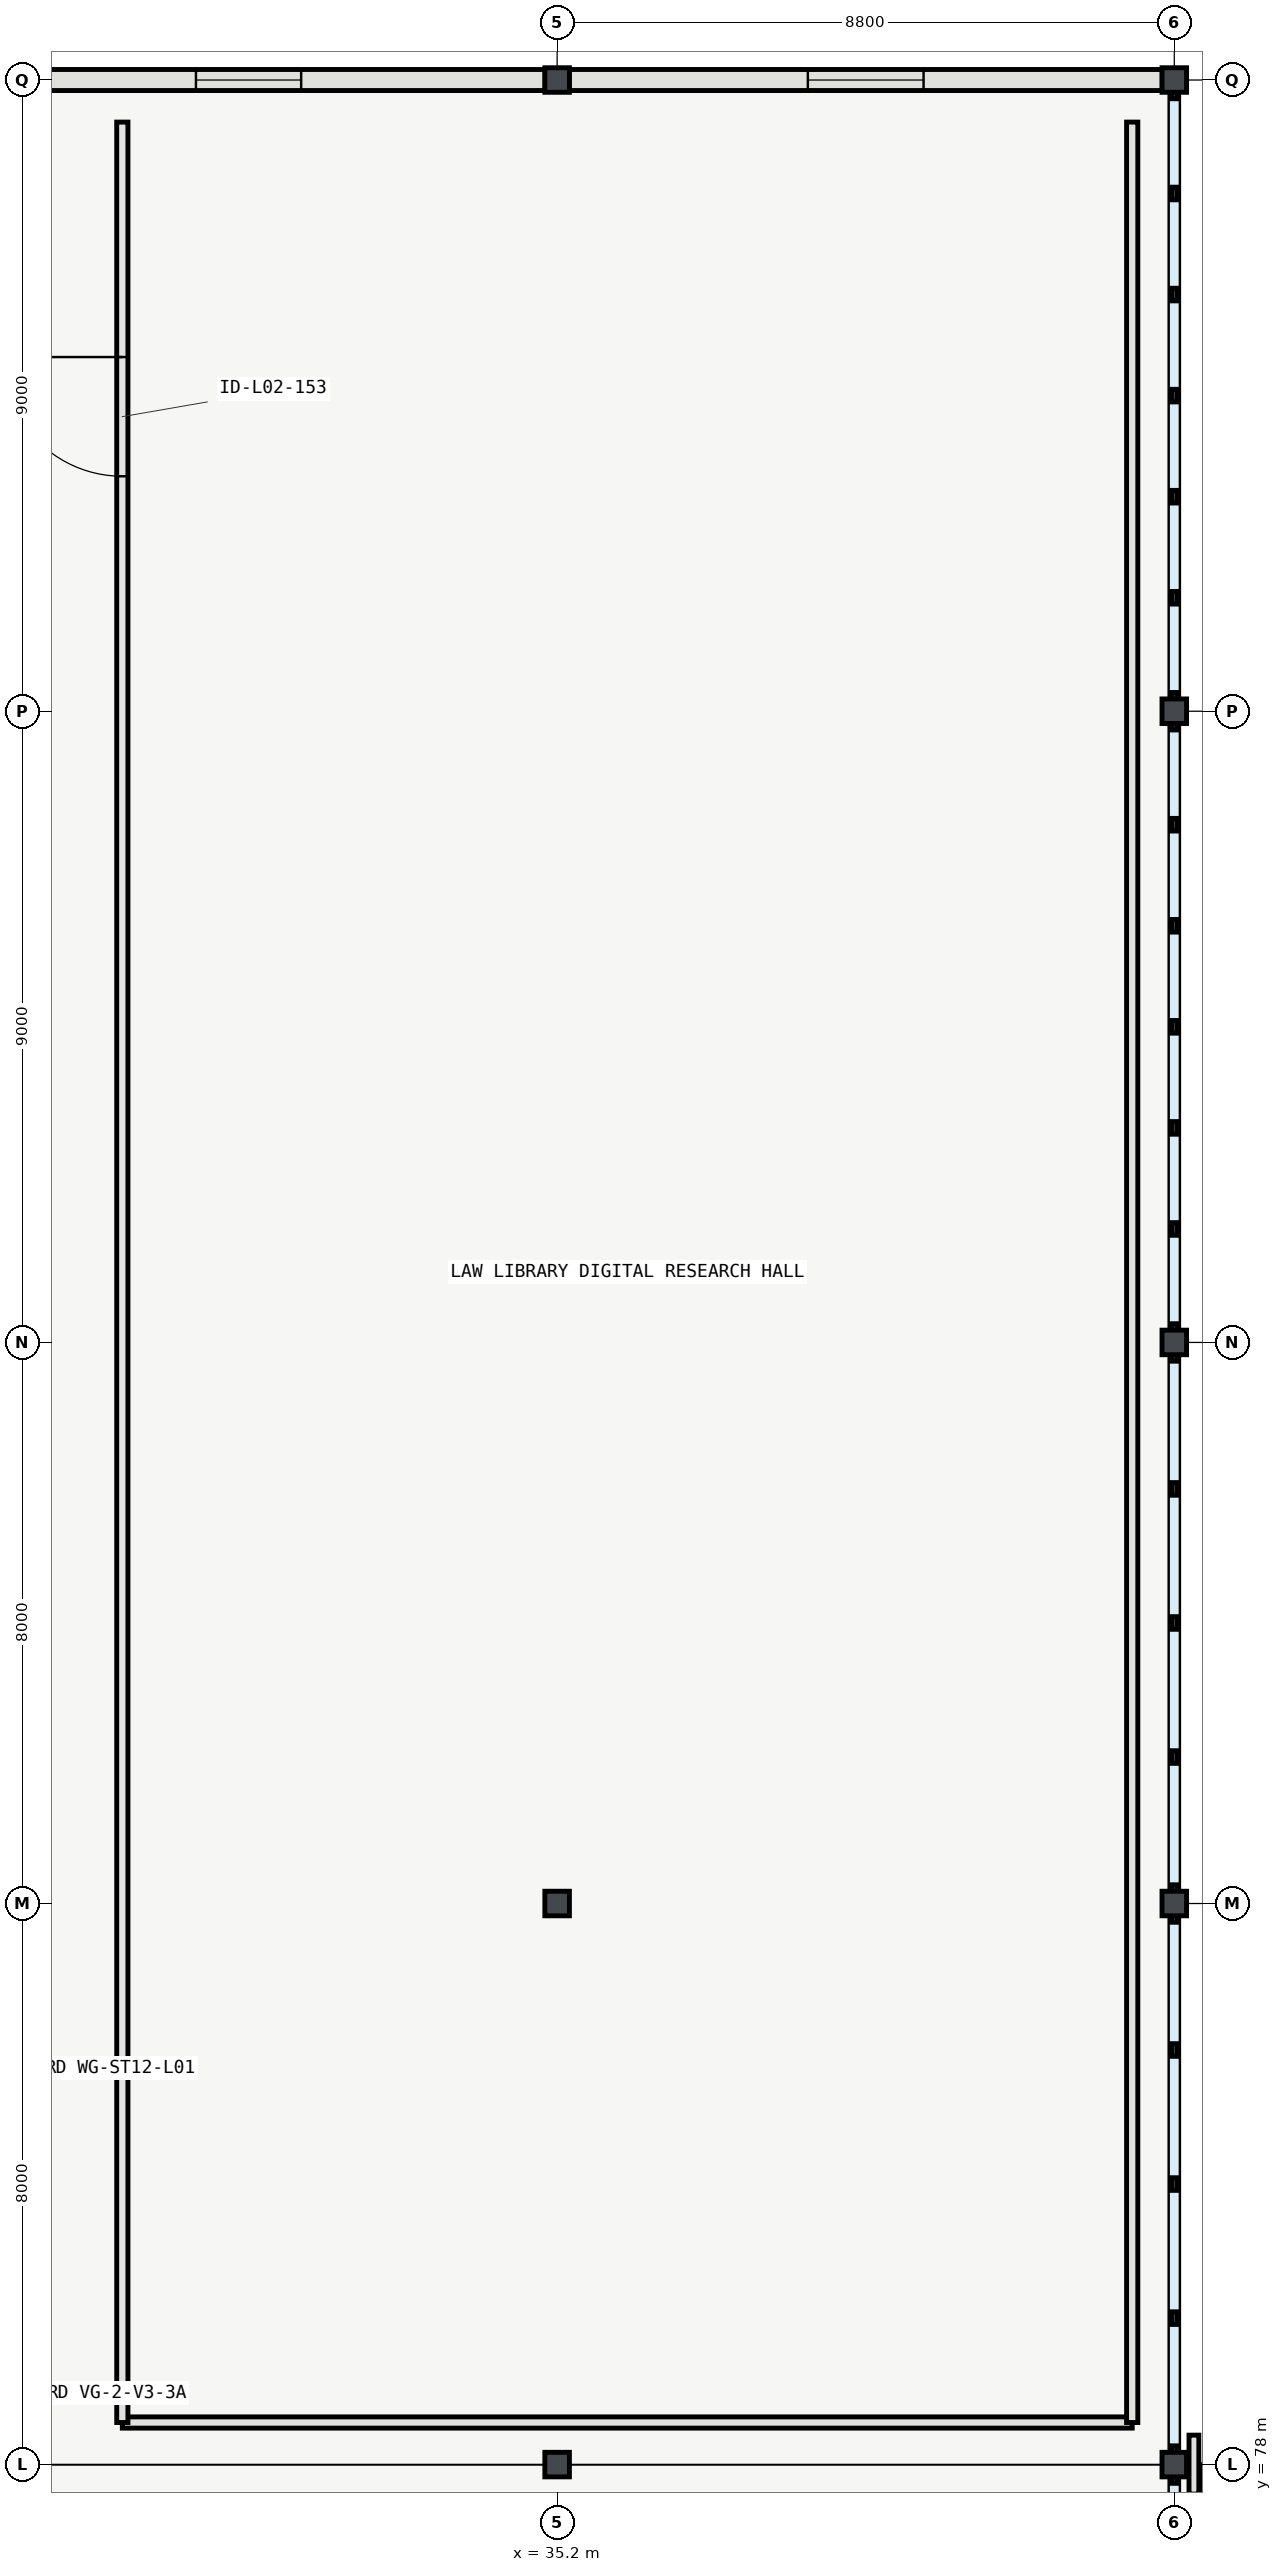
"""IFC4 building model, lengths in metres.
Left out: names, types, materials, properties, quantities, classifications, styles, units other than length and angle.
Written with IfcOpenShell. Run it as: python <this file> out.ifc"""

import sys

from ifc_helpers import new_model, si_unit, direction, frame, frame_2d, origin, origin_2d, place, context, subcontext, project, spatial, rectangle, i_section, extrude, element, fill, save


model = new_model("IFC4")
c1 = context("Model", 3, precision=1e-05, world=origin(), true_north=direction((0.0, 1.0)))
c2 = subcontext(c1, "Body", "Model", "MODEL_VIEW")
j1 = project(units=[si_unit("LENGTHUNIT", "METRE"), si_unit("PLANEANGLEUNIT", "RADIAN")], contexts=[c1])
p1 = place(None, origin())
s1 = spatial("IfcSite", under=j1, at=p1, CompositionType="ELEMENT")
p2 = place(p1, origin())
s2 = spatial("IfcBuilding", under=s1, at=p2, CompositionType="ELEMENT")
p3 = place(p2, frame((0.0, 0.0, 10.8)))
s3 = spatial("IfcBuildingStorey", under=s2, at=p3, CompositionType="ELEMENT", Elevation=10.8)
for number, where, z_axis, x_axis in (
    (1, (35.2, 78.0, 0.0), (0.0, 0.0, 1.0), (1.0, 0.0, 0.0)),
    (2, (35.2, 86.0, 0.0), (0.0, 0.0, 1.0), (1.0, 0.0, 0.0)),
    (3, (35.2, 112.0, 0.0), (0.0, 0.0, 1.0), (1.0, 0.0, 0.0)),
    (4, (44.0, 78.0, 0.0), (0.0, 0.0, 1.0), (1.0, 0.0, 0.0)),
    (5, (44.0, 86.0, 0.0), (0.0, 0.0, 1.0), (1.0, 0.0, 0.0)),
    (6, (44.0, 94.0, 0.0), (0.0, 0.0, 1.0), (1.0, 0.0, 0.0)),
    (7, (44.0, 103.0, 0.0), (0.0, 0.0, 1.0), (1.0, 0.0, 0.0)),
    (8, (44.0, 112.0, 0.0), (0.0, 0.0, 1.0), (1.0, 0.0, 0.0)),
):
    element("IfcColumn", number, at=place(p3, frame(where, z_axis=z_axis, x_axis=x_axis)), inside=s3, PredefinedType="COLUMN", context=c2, shape_type="SweptSolid", body=[
        extrude(i_section(OverallWidth=0.35, OverallDepth=0.35, WebThickness=0.012, FlangeThickness=0.019, FilletRadius=0.02, at=origin_2d()), origin(), (0.0, 0.0, 1.0), 5.4),
    ])
p4 = place(p3, frame((35.029, 112.0, 0.0), z_axis=(0.0, 0.0, 1.0), x_axis=(-1.0, 0.0, 0.0)))
e9 = element("IfcWall", 9, at=p4, inside=s3, PredefinedType="SOLIDWALL", context=c2, shape_type="SweptSolid", body=[
    extrude(rectangle(XDim=8.458, YDim=0.3, at=frame_2d((4.229, 0.0))), origin(), (0.0, 0.0, 1.0), 4.763),
])
p5 = place(p4, frame((3.479, 0.0, 0.95)))
e10 = element("IfcOpeningElement", 10, at=p5, cuts=e9, PredefinedType="OPENING", context=c2, shape_type="SweptSolid", body=[
    extrude(rectangle(XDim=1.5, YDim=2.1, at=frame_2d((0.75, 1.05))), frame((0.0, 0.16, 0.0), z_axis=(0.0, -1.0, 0.0), x_axis=(1.0, 0.0, 0.0)), (0.0, 0.0, 1.0), 0.32),
])
p6 = place(p3, frame((43.829, 112.0, 0.0), z_axis=(0.0, 0.0, 1.0), x_axis=(-1.0, 0.0, 0.0)))
e11 = element("IfcWall", 11, at=p6, inside=s3, PredefinedType="SOLIDWALL", context=c2, shape_type="SweptSolid", body=[
    extrude(rectangle(XDim=8.458, YDim=0.3, at=frame_2d((4.229, 0.0))), origin(), (0.0, 0.0, 1.0), 4.763),
])
p7 = place(p6, frame((3.404, 0.0, 0.95)))
e12 = element("IfcOpeningElement", 12, at=p7, cuts=e11, PredefinedType="OPENING", context=c2, shape_type="SweptSolid", body=[
    extrude(rectangle(XDim=1.65, YDim=2.1, at=frame_2d((0.825, 1.05))), frame((0.0, 0.16, 0.0), z_axis=(0.0, -1.0, 0.0), x_axis=(1.0, 0.0, 0.0)), (0.0, 0.0, 1.0), 0.32),
])
p8 = place(p3, frame((44.44, 30.0, 0.0), z_axis=(0.0, 0.0, 1.0), x_axis=(0.0, 1.0, 0.0)))
e13 = element("IfcWall", 13, at=p8, inside=s3, PredefinedType="SOLIDWALL", context=c2, shape_type="SweptSolid", body=[
    extrude(rectangle(XDim=48.0, YDim=0.16, at=frame_2d((24.0, 0.0))), origin(), (0.0, 0.0, 1.0), 0.58),
])
p9 = place(p3, frame((44.28, 77.58, 0.0), z_axis=(0.0, 0.0, 1.0), x_axis=(0.0, 1.0, 0.0)))
e14 = element("IfcWall", 14, at=p9, inside=s3, PredefinedType="SOLIDWALL", context=c2, shape_type="SweptSolid", body=[
    extrude(rectangle(XDim=0.84, YDim=0.14, at=frame_2d((0.42, 0.0))), origin(), (0.0, 0.0, 1.0), 5.14),
])
p10 = place(p3, frame((29.0, 78.6, 0.0), z_axis=(0.0, 0.0, 1.0), x_axis=(1.0, 0.0, 0.0)))
e15 = element("IfcWall", 15, at=p10, inside=s3, PredefinedType="PARTITIONING", context=c2, shape_type="SweptSolid", body=[
    extrude(rectangle(XDim=14.4, YDim=0.16, at=frame_2d((7.2, 0.0))), origin(), (0.0, 0.0, 1.0), 5.12),
])
p11 = place(p3, frame((29.0, 111.4, 0.0), z_axis=(0.0, 0.0, 1.0), x_axis=(0.0, -1.0, 0.0)))
e16 = element("IfcWall", 16, at=p11, inside=s3, PredefinedType="PARTITIONING", context=c2, shape_type="SweptSolid", body=[
    extrude(rectangle(XDim=32.8, YDim=0.16, at=frame_2d((16.4, 0.0))), origin(), (0.0, 0.0, 1.0), 5.12),
])
p12 = place(p11, frame((3.35, 0.0, 0.0)))
e17 = element("IfcOpeningElement", 17, at=p12, cuts=e16, PredefinedType="OPENING", context=c2, shape_type="SweptSolid", body=[
    extrude(rectangle(XDim=1.7, YDim=2.3, at=frame_2d((0.85, 1.15))), frame((0.0, 0.09, 0.0), z_axis=(0.0, -1.0, 0.0), x_axis=(1.0, 0.0, 0.0)), (0.0, 0.0, 1.0), 0.18),
])
p13 = place(p3, frame((43.4, 78.6, 0.0), z_axis=(0.0, 0.0, 1.0), x_axis=(0.0, 1.0, 0.0)))
e18 = element("IfcWall", 18, at=p13, inside=s3, PredefinedType="PARTITIONING", context=c2, shape_type="SweptSolid", body=[
    extrude(rectangle(XDim=32.8, YDim=0.16, at=frame_2d((16.4, 0.0))), origin(), (0.0, 0.0, 1.0), 5.12),
])
p14 = place(p5, origin())
e19 = element("IfcWindow", 19, at=p14, inside=s3, PartitioningType="SINGLE_PANEL", PredefinedType="WINDOW", context=c2, shape_type="SweptSolid", body=[
    extrude(rectangle(XDim=1.5, YDim=2.1, at=frame_2d((0.75, 1.05))), frame((0.0, 0.03, 0.0), z_axis=(0.0, -1.0, 0.0), x_axis=(1.0, 0.0, 0.0)), (0.0, 0.0, 1.0), 0.06),
])
fill(e10, e19)
p15 = place(p7, origin())
e20 = element("IfcWindow", 20, at=p15, inside=s3, PartitioningType="SINGLE_PANEL", PredefinedType="WINDOW", context=c2, shape_type="SweptSolid", body=[
    extrude(rectangle(XDim=1.65, YDim=2.1, at=frame_2d((0.825, 1.05))), frame((0.0, 0.03, 0.0), z_axis=(0.0, -1.0, 0.0), x_axis=(1.0, 0.0, 0.0)), (0.0, 0.0, 1.0), 0.06),
])
fill(e12, e20)
p16 = place(p12, origin())
e21 = element("IfcDoor", 21, at=p16, inside=s3, OperationType="DOUBLE_DOOR_SINGLE_SWING", PredefinedType="DOOR", context=c2, shape_type="SweptSolid", body=[
    extrude(rectangle(XDim=1.7, YDim=2.3, at=frame_2d((0.85, 1.15))), frame((0.0, 0.025, 0.0), z_axis=(0.0, -1.0, 0.0), x_axis=(1.0, 0.0, 0.0)), (0.0, 0.0, 1.0), 0.05),
])
fill(e17, e21)
save(model, sys.argv[1])
